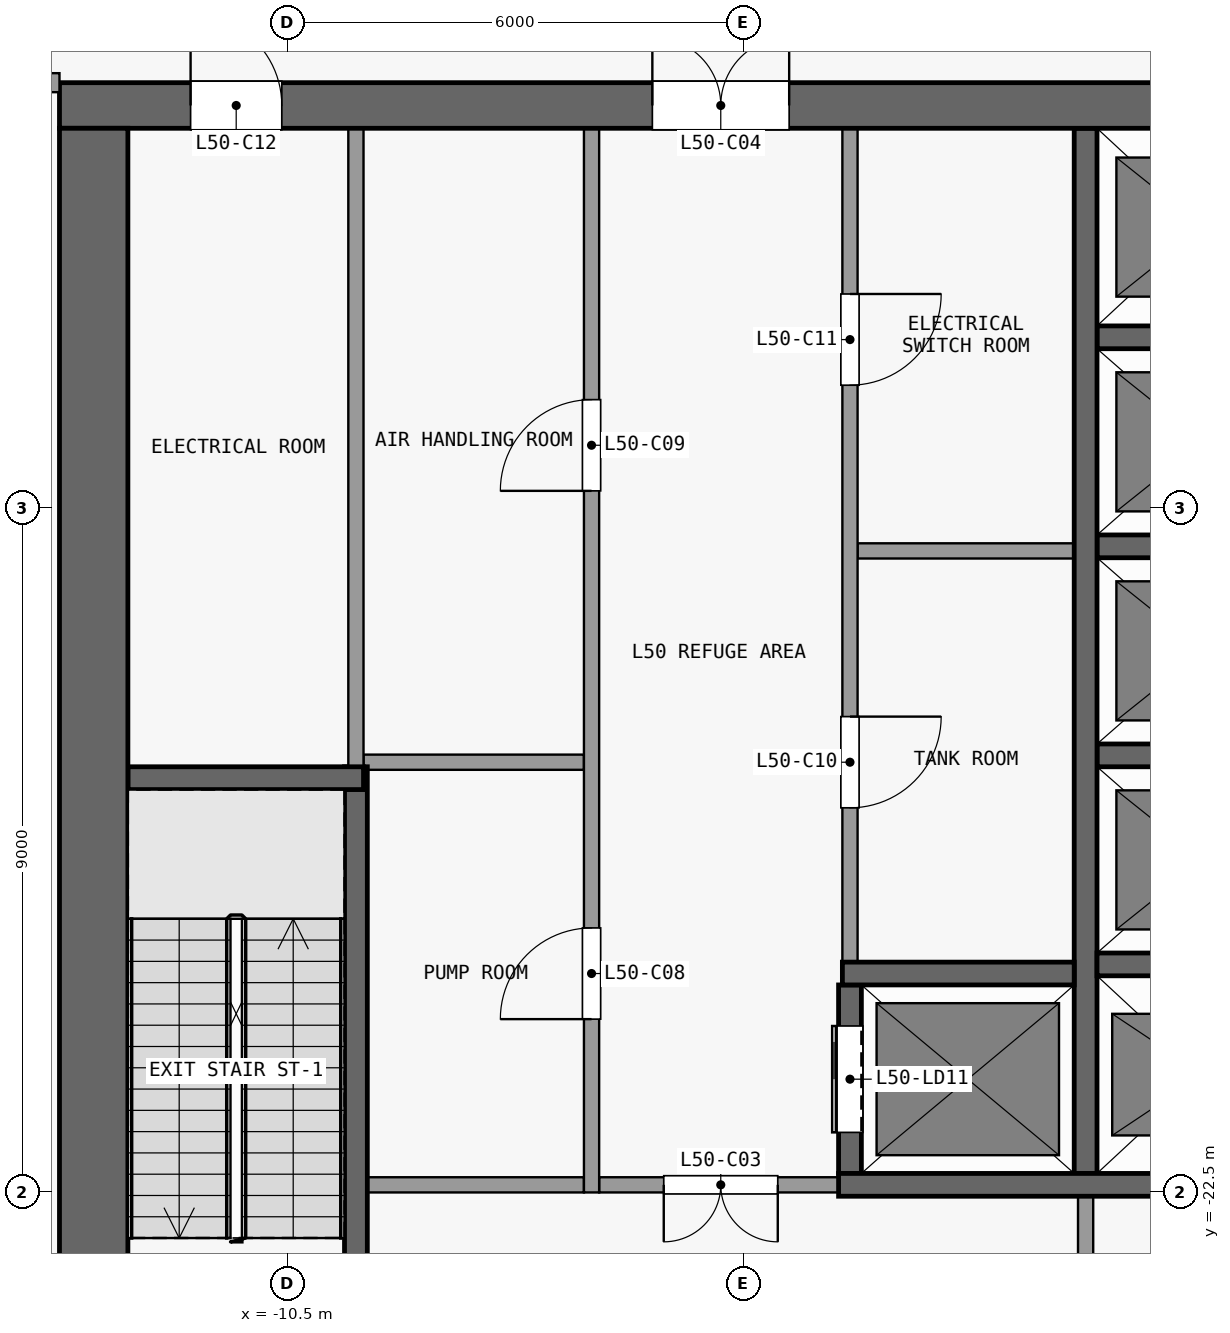
"""IFC4 building model, lengths in metres.
Left out: names, types, materials, properties, quantities, classifications, styles, units other than length and angle.
Written with IfcOpenShell. Run it as: python <this file> out.ifc"""

import sys

from ifc_helpers import new_model, si_unit, direction, frame, frame_2d, origin, place, context, subcontext, project, spatial, rectangle, extrude, element, fill, save


model = new_model("IFC4")
c1 = context("Model", 3, precision=1e-05, world=origin(), true_north=direction((0.0, 1.0)))
c2 = subcontext(c1, "Body", "Model", "MODEL_VIEW")
j1 = project(units=[si_unit("LENGTHUNIT", "METRE"), si_unit("PLANEANGLEUNIT", "RADIAN")], contexts=[c1])
p1 = place(None, origin())
s1 = spatial("IfcSite", under=j1, at=p1, CompositionType="ELEMENT")
p2 = place(p1, origin())
s2 = spatial("IfcBuilding", under=s1, at=p2, CompositionType="ELEMENT")
p3 = place(p2, frame((0.0, 0.0, 199.7)))
s3 = spatial("IfcBuildingStorey", under=s2, at=p3, CompositionType="ELEMENT", Elevation=199.7)
p4 = place(p3, frame((-13.5, -8.2, 0.0), z_axis=(0.0, 0.0, 1.0), x_axis=(1.0, 0.0, 0.0)))
e1 = element("IfcWall", 1, at=p4, inside=s3, PredefinedType="SHEAR", context=c2, shape_type="SweptSolid", body=[
    extrude(rectangle(XDim=27.0, YDim=0.6, at=frame_2d((13.5, 0.0))), origin(), (0.0, 0.0, 1.0), 5.0),
])
p5 = place(p4, frame((7.8, 0.0, 0.0)))
e2 = element("IfcOpeningElement", 2, at=p5, cuts=e1, PredefinedType="OPENING", context=c2, shape_type="SweptSolid", body=[
    extrude(rectangle(XDim=1.8, YDim=2.1, at=frame_2d((0.9, 1.05))), frame((0.0, 0.31, 0.0), z_axis=(0.0, -1.0, 0.0), x_axis=(1.0, 0.0, 0.0)), (0.0, 0.0, 1.0), 0.62),
])
p6 = place(p4, frame((17.4, 0.0, 0.0)))
e3 = element("IfcOpeningElement", 3, at=p6, cuts=e1, PredefinedType="OPENING", context=c2, shape_type="SweptSolid", body=[
    extrude(rectangle(XDim=1.8, YDim=2.1, at=frame_2d((0.9, 1.05))), frame((0.0, 0.31, 0.0), z_axis=(0.0, -1.0, 0.0), x_axis=(1.0, 0.0, 0.0)), (0.0, 0.0, 1.0), 0.62),
])
p7 = place(p4, frame((1.725, 0.0, 0.0)))
e4 = element("IfcOpeningElement", 4, at=p7, cuts=e1, PredefinedType="OPENING", context=c2, shape_type="SweptSolid", body=[
    extrude(rectangle(XDim=1.2, YDim=2.1, at=frame_2d((0.6, 1.05))), frame((0.0, 0.31, 0.0), z_axis=(0.0, -1.0, 0.0), x_axis=(1.0, 0.0, 0.0)), (0.0, 0.0, 1.0), 0.62),
])
p8 = place(p4, frame((23.375, 0.0, 0.0)))
e5 = element("IfcOpeningElement", 5, at=p8, cuts=e1, PredefinedType="OPENING", context=c2, shape_type="SweptSolid", body=[
    extrude(rectangle(XDim=0.9, YDim=2.1, at=frame_2d((0.45, 1.05))), frame((0.0, 0.31, 0.0), z_axis=(0.0, -1.0, 0.0), x_axis=(1.0, 0.0, 0.0)), (0.0, 0.0, 1.0), 0.62),
])
p9 = place(p3, frame((-13.05, -24.6, 0.0), z_axis=(0.0, 0.0, 1.0), x_axis=(0.0, 1.0, 0.0)))
e6 = element("IfcWall", 6, at=p9, inside=s3, PredefinedType="SHEAR", context=c2, shape_type="SweptSolid", body=[
    extrude(rectangle(XDim=16.1, YDim=0.9, at=frame_2d((8.05, 0.0))), origin(), (0.0, 0.0, 1.0), 5.0),
])
p10 = place(p3, frame((-9.45, -22.4, 0.0), z_axis=(0.0, 0.0, 1.0), x_axis=(1.0, 0.0, 0.0)))
e7 = element("IfcWall", 7, at=p10, inside=s3, PredefinedType="PARTITIONING", context=c2, shape_type="SweptSolid", body=[
    extrude(rectangle(XDim=2.85, YDim=0.2, at=frame_2d((1.425, 0.0))), origin(), (0.0, 0.0, 1.0), 5.0),
])
p11 = place(p3, frame((-3.25, -22.4, 0.0), z_axis=(0.0, 0.0, 1.0), x_axis=(-1.0, 0.0, 0.0)))
e8 = element("IfcWall", 8, at=p11, inside=s3, PredefinedType="PARTITIONING", context=c2, shape_type="SweptSolid", body=[
    extrude(rectangle(XDim=3.15, YDim=0.2, at=frame_2d((1.575, 0.0))), origin(), (0.0, 0.0, 1.0), 5.0),
])
p12 = place(p11, frame((0.8, 0.0, 0.0)))
e9 = element("IfcOpeningElement", 9, at=p12, cuts=e8, PredefinedType="OPENING", context=c2, shape_type="SweptSolid", body=[
    extrude(rectangle(XDim=1.5, YDim=2.1, at=frame_2d((0.75, 1.05))), frame((0.0, 0.11, 0.0), z_axis=(0.0, -1.0, 0.0), x_axis=(1.0, 0.0, 0.0)), (0.0, 0.0, 1.0), 0.22),
])
p13 = place(p3, frame((-3.25, -22.4, 0.0), z_axis=(0.0, 0.0, 1.0), x_axis=(1.0, 0.0, 0.0)))
e10 = element("IfcWall", 10, at=p13, inside=s3, PredefinedType="SHEAR", context=c2, shape_type="SweptSolid", body=[
    extrude(rectangle(XDim=6.2, YDim=0.3, at=frame_2d((3.1, 0.0))), origin(), (0.0, 0.0, 1.0), 5.0),
])
p14 = place(p3, frame((-3.2, -19.62, 0.0), z_axis=(0.0, 0.0, 1.0), x_axis=(1.0, 0.0, 0.0)))
e11 = element("IfcWall", 11, at=p14, inside=s3, PredefinedType="SHEAR", context=c2, shape_type="SweptSolid", body=[
    extrude(rectangle(XDim=3.05, YDim=0.3, at=frame_2d((1.525, 0.0))), origin(), (0.0, 0.0, 1.0), 5.0),
])
p15 = place(p3, frame((0.15, -19.5, 0.0), z_axis=(0.0, 0.0, 1.0), x_axis=(1.0, 0.0, 0.0)))
e12 = element("IfcWall", 12, at=p15, inside=s3, PredefinedType="SHEAR", context=c2, shape_type="SweptSolid", body=[
    extrude(rectangle(XDim=2.8, YDim=0.3, at=frame_2d((1.4, 0.0))), origin(), (0.0, 0.0, 1.0), 5.0),
])
p16 = place(p3, frame((-12.6, -17.05, 0.0), z_axis=(0.0, 0.0, 1.0), x_axis=(1.0, 0.0, 0.0)))
e13 = element("IfcWall", 13, at=p16, inside=s3, PredefinedType="SHEAR", context=c2, shape_type="SweptSolid", body=[
    extrude(rectangle(XDim=3.1, YDim=0.3, at=frame_2d((1.55, 0.0))), origin(), (0.0, 0.0, 1.0), 5.0),
])
p17 = place(p3, frame((-9.5, -16.84, 0.0), z_axis=(0.0, 0.0, 1.0), x_axis=(1.0, 0.0, 0.0)))
e14 = element("IfcWall", 14, at=p17, inside=s3, PredefinedType="PARTITIONING", context=c2, shape_type="SweptSolid", body=[
    extrude(rectangle(XDim=2.9, YDim=0.2, at=frame_2d((1.45, 0.0))), origin(), (0.0, 0.0, 1.0), 5.0),
])
p18 = place(p3, frame((0.15, -16.75, 0.0), z_axis=(0.0, 0.0, 1.0), x_axis=(1.0, 0.0, 0.0)))
e15 = element("IfcWall", 15, at=p18, inside=s3, PredefinedType="SHEAR", context=c2, shape_type="SweptSolid", body=[
    extrude(rectangle(XDim=2.8, YDim=0.3, at=frame_2d((1.4, 0.0))), origin(), (0.0, 0.0, 1.0), 5.0),
])
p19 = place(p3, frame((-3.0, -14.06, 0.0), z_axis=(0.0, 0.0, 1.0), x_axis=(1.0, 0.0, 0.0)))
e16 = element("IfcWall", 16, at=p19, inside=s3, PredefinedType="PARTITIONING", context=c2, shape_type="SweptSolid", body=[
    extrude(rectangle(XDim=2.85, YDim=0.2, at=frame_2d((1.425, 0.0))), origin(), (0.0, 0.0, 1.0), 5.0),
])
for number, where, z_axis, x_axis in (
    (17, (0.15, -14.0, 0.0), (0.0, 0.0, 1.0), (1.0, 0.0, 0.0)),
    (18, (0.15, -11.25, 0.0), (0.0, 0.0, 1.0), (1.0, 0.0, 0.0)),
):
    element("IfcWall", number, at=place(p3, frame(where, z_axis=z_axis, x_axis=x_axis)), inside=s3, PredefinedType="SHEAR", context=c2, shape_type="SweptSolid", body=[
        extrude(rectangle(XDim=2.8, YDim=0.3, at=frame_2d((1.4, 0.0))), origin(), (0.0, 0.0, 1.0), 5.0),
    ])
p20 = place(p3, frame((-9.6, -24.6, 0.0), z_axis=(0.0, 0.0, 1.0), x_axis=(0.0, 1.0, 0.0)))
e19 = element("IfcWall", 19, at=p20, inside=s3, PredefinedType="SHEAR", context=c2, shape_type="SweptSolid", body=[
    extrude(rectangle(XDim=7.7, YDim=0.3, at=frame_2d((3.85, 0.0))), origin(), (0.0, 0.0, 1.0), 5.0),
])
p21 = place(p20, frame((0.1, 0.0, 0.0)))
e20 = element("IfcOpeningElement", 20, at=p21, cuts=e19, PredefinedType="OPENING", context=c2, shape_type="SweptSolid", body=[
    extrude(rectangle(XDim=1.1, YDim=2.1, at=frame_2d((0.55, 1.05))), frame((0.0, 0.16, 0.0), z_axis=(0.0, -1.0, 0.0), x_axis=(1.0, 0.0, 0.0)), (0.0, 0.0, 1.0), 0.32),
])
p22 = place(p3, frame((-9.6, -16.9, 0.0), z_axis=(0.0, 0.0, 1.0), x_axis=(0.0, 1.0, 0.0)))
e21 = element("IfcWall", 21, at=p22, inside=s3, PredefinedType="PARTITIONING", context=c2, shape_type="SweptSolid", body=[
    extrude(rectangle(XDim=8.4, YDim=0.2, at=frame_2d((4.2, 0.0))), origin(), (0.0, 0.0, 1.0), 5.0),
])
p23 = place(p3, frame((-6.5, -22.5, 0.0), z_axis=(0.0, 0.0, 1.0), x_axis=(0.0, 1.0, 0.0)))
e22 = element("IfcWall", 22, at=p23, inside=s3, PredefinedType="PARTITIONING", context=c2, shape_type="SweptSolid", body=[
    extrude(rectangle(XDim=14.0, YDim=0.2, at=frame_2d((7.0, 0.0))), origin(), (0.0, 0.0, 1.0), 5.0),
])
p24 = place(p23, frame((2.28, 0.0, 0.0)))
e23 = element("IfcOpeningElement", 23, at=p24, cuts=e22, PredefinedType="OPENING", context=c2, shape_type="SweptSolid", body=[
    extrude(rectangle(XDim=1.2, YDim=2.1, at=frame_2d((0.6, 1.05))), frame((0.0, 0.11, 0.0), z_axis=(0.0, -1.0, 0.0), x_axis=(1.0, 0.0, 0.0)), (0.0, 0.0, 1.0), 0.22),
])
p25 = place(p23, frame((9.23, 0.0, 0.0)))
e24 = element("IfcOpeningElement", 24, at=p25, cuts=e22, PredefinedType="OPENING", context=c2, shape_type="SweptSolid", body=[
    extrude(rectangle(XDim=1.2, YDim=2.1, at=frame_2d((0.6, 1.05))), frame((0.0, 0.11, 0.0), z_axis=(0.0, -1.0, 0.0), x_axis=(1.0, 0.0, 0.0)), (0.0, 0.0, 1.0), 0.22),
])
p26 = place(p3, frame((-3.1, -22.25, 0.0), z_axis=(0.0, 0.0, 1.0), x_axis=(0.0, 1.0, 0.0)))
e25 = element("IfcWall", 25, at=p26, inside=s3, PredefinedType="SHEAR", context=c2, shape_type="SweptSolid", body=[
    extrude(rectangle(XDim=2.48, YDim=0.3, at=frame_2d((1.24, 0.0))), origin(), (0.0, 0.0, 1.0), 5.0),
])
p27 = place(p26, frame((0.54, 0.0, 0.0)))
e26 = element("IfcOpeningElement", 26, at=p27, cuts=e25, PredefinedType="OPENING", context=c2, shape_type="SweptSolid", body=[
    extrude(rectangle(XDim=1.4, YDim=2.1, at=frame_2d((0.7, 1.05))), frame((0.0, 0.16, 0.0), z_axis=(0.0, -1.0, 0.0), x_axis=(1.0, 0.0, 0.0)), (0.0, 0.0, 1.0), 0.32),
])
p28 = place(p3, frame((-3.1, -8.5, 0.0), z_axis=(0.0, 0.0, 1.0), x_axis=(0.0, -1.0, 0.0)))
e27 = element("IfcWall", 27, at=p28, inside=s3, PredefinedType="PARTITIONING", context=c2, shape_type="SweptSolid", body=[
    extrude(rectangle(XDim=10.97, YDim=0.2, at=frame_2d((5.485, 0.0))), origin(), (0.0, 0.0, 1.0), 5.0),
])
p29 = place(p28, frame((7.74, 0.0, 0.0)))
e28 = element("IfcOpeningElement", 28, at=p29, cuts=e27, PredefinedType="OPENING", context=c2, shape_type="SweptSolid", body=[
    extrude(rectangle(XDim=1.2, YDim=2.1, at=frame_2d((0.6, 1.05))), frame((0.0, 0.11, 0.0), z_axis=(0.0, -1.0, 0.0), x_axis=(1.0, 0.0, 0.0)), (0.0, 0.0, 1.0), 0.22),
])
p30 = place(p28, frame((2.18, 0.0, 0.0)))
e29 = element("IfcOpeningElement", 29, at=p30, cuts=e27, PredefinedType="OPENING", context=c2, shape_type="SweptSolid", body=[
    extrude(rectangle(XDim=1.2, YDim=2.1, at=frame_2d((0.6, 1.05))), frame((0.0, 0.11, 0.0), z_axis=(0.0, -1.0, 0.0), x_axis=(1.0, 0.0, 0.0)), (0.0, 0.0, 1.0), 0.22),
])
p31 = place(p3, frame((0.0, -24.6, 0.0), z_axis=(0.0, 0.0, 1.0), x_axis=(0.0, 1.0, 0.0)))
e30 = element("IfcWall", 30, at=p31, inside=s3, PredefinedType="PARTITIONING", context=c2, shape_type="SweptSolid", body=[
    extrude(rectangle(XDim=2.05, YDim=0.2, at=frame_2d((1.025, 0.0))), origin(), (0.0, 0.0, 1.0), 5.0),
])
p32 = place(p3, frame((0.0, -22.25, 0.0), z_axis=(0.0, 0.0, 1.0), x_axis=(0.0, 1.0, 0.0)))
e31 = element("IfcWall", 31, at=p32, inside=s3, PredefinedType="SHEAR", context=c2, shape_type="SweptSolid", body=[
    extrude(rectangle(XDim=13.75, YDim=0.3, at=frame_2d((6.875, 0.0))), origin(), (0.0, 0.0, 1.0), 5.0),
])
p33 = place(p3, frame((-19.35, -7.9, 0.0), z_axis=(0.0, 0.0, 1.0), x_axis=(1.0, 0.0, 0.0)))
e32 = element("IfcWall", 32, at=p33, inside=s3, PredefinedType="PARTITIONING", context=c2, shape_type="SweptSolid", body=[
    extrude(rectangle(XDim=5.85, YDim=0.25, at=frame_2d((2.925, 0.0))), origin(), (0.0, 0.0, 1.0), 5.0),
])
p34 = place(p33, frame((3.7, 0.0, 0.0)))
e33 = element("IfcOpeningElement", 33, at=p34, cuts=e32, PredefinedType="OPENING", context=c2, shape_type="SweptSolid", body=[
    extrude(rectangle(XDim=1.2, YDim=2.1, at=frame_2d((0.6, 1.05))), frame((0.0, 0.135, 0.0), z_axis=(0.0, -1.0, 0.0), x_axis=(1.0, 0.0, 0.0)), (0.0, 0.0, 1.0), 0.27),
])
p35 = place(p27, origin())
e34 = element("IfcDoor", 34, at=p35, inside=s3, OperationType="DOUBLE_DOOR_SLIDING", PredefinedType="DOOR", context=c2, shape_type="SweptSolid", body=[
    extrude(rectangle(XDim=1.4, YDim=2.1, at=frame_2d((0.7, 1.05))), frame((0.0, 0.025, 0.0), z_axis=(0.0, -1.0, 0.0), x_axis=(1.0, 0.0, 0.0)), (0.0, 0.0, 1.0), 0.05),
])
fill(e26, e34)
p36 = place(p12, origin())
e35 = element("IfcDoor", 35, at=p36, inside=s3, OperationType="DOUBLE_DOOR_SINGLE_SWING", PredefinedType="DOOR", context=c2, shape_type="SweptSolid", body=[
    extrude(rectangle(XDim=1.5, YDim=2.1, at=frame_2d((0.75, 1.05))), frame((0.0, 0.025, 0.0), z_axis=(0.0, -1.0, 0.0), x_axis=(1.0, 0.0, 0.0)), (0.0, 0.0, 1.0), 0.05),
])
fill(e9, e35)
p37 = place(p5, origin())
e36 = element("IfcDoor", 36, at=p37, inside=s3, OperationType="DOUBLE_DOOR_SINGLE_SWING", PredefinedType="DOOR", context=c2, shape_type="SweptSolid", body=[
    extrude(rectangle(XDim=1.8, YDim=2.1, at=frame_2d((0.9, 1.05))), frame((0.0, 0.025, 0.0), z_axis=(0.0, -1.0, 0.0), x_axis=(1.0, 0.0, 0.0)), (0.0, 0.0, 1.0), 0.05),
])
fill(e2, e36)
p38 = place(p24, origin())
e37 = element("IfcDoor", 37, at=p38, inside=s3, OperationType="SINGLE_SWING_LEFT", PredefinedType="DOOR", context=c2, shape_type="SweptSolid", body=[
    extrude(rectangle(XDim=1.2, YDim=2.1, at=frame_2d((0.6, 1.05))), frame((0.0, 0.025, 0.0), z_axis=(0.0, -1.0, 0.0), x_axis=(1.0, 0.0, 0.0)), (0.0, 0.0, 1.0), 0.05),
])
fill(e23, e37)
p39 = place(p25, origin())
e38 = element("IfcDoor", 38, at=p39, inside=s3, OperationType="SINGLE_SWING_LEFT", PredefinedType="DOOR", context=c2, shape_type="SweptSolid", body=[
    extrude(rectangle(XDim=1.2, YDim=2.1, at=frame_2d((0.6, 1.05))), frame((0.0, 0.025, 0.0), z_axis=(0.0, -1.0, 0.0), x_axis=(1.0, 0.0, 0.0)), (0.0, 0.0, 1.0), 0.05),
])
fill(e24, e38)
p40 = place(p29, origin())
e39 = element("IfcDoor", 39, at=p40, inside=s3, OperationType="SINGLE_SWING_LEFT", PredefinedType="DOOR", context=c2, shape_type="SweptSolid", body=[
    extrude(rectangle(XDim=1.2, YDim=2.1, at=frame_2d((0.6, 1.05))), frame((0.0, 0.025, 0.0), z_axis=(0.0, -1.0, 0.0), x_axis=(1.0, 0.0, 0.0)), (0.0, 0.0, 1.0), 0.05),
])
fill(e28, e39)
p41 = place(p30, origin())
e40 = element("IfcDoor", 40, at=p41, inside=s3, OperationType="SINGLE_SWING_LEFT", PredefinedType="DOOR", context=c2, shape_type="SweptSolid", body=[
    extrude(rectangle(XDim=1.2, YDim=2.1, at=frame_2d((0.6, 1.05))), frame((0.0, 0.025, 0.0), z_axis=(0.0, -1.0, 0.0), x_axis=(1.0, 0.0, 0.0)), (0.0, 0.0, 1.0), 0.05),
])
fill(e29, e40)
p42 = place(p7, origin())
e41 = element("IfcDoor", 41, at=p42, inside=s3, OperationType="SINGLE_SWING_LEFT", PredefinedType="DOOR", context=c2, shape_type="SweptSolid", body=[
    extrude(rectangle(XDim=1.2, YDim=2.1, at=frame_2d((0.6, 1.05))), frame((0.0, 0.025, 0.0), z_axis=(0.0, -1.0, 0.0), x_axis=(1.0, 0.0, 0.0)), (0.0, 0.0, 1.0), 0.05),
])
fill(e4, e41)
save(model, sys.argv[1])
